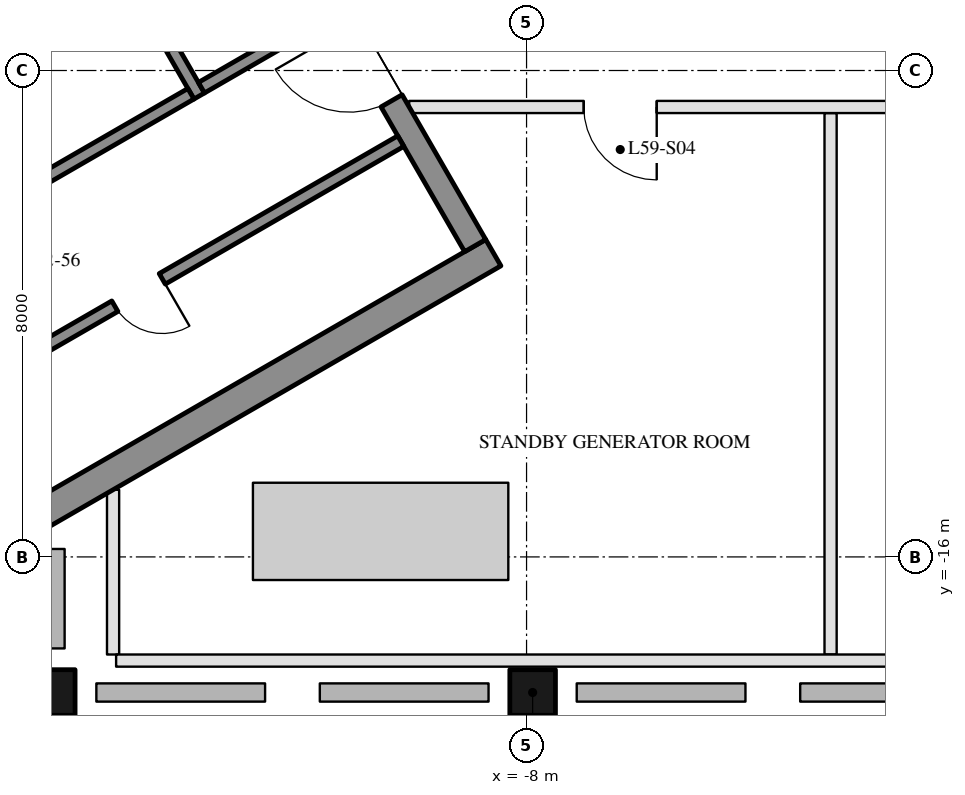
"""IFC4 building model, lengths in metres.
Left out: names, types, materials, properties, quantities, classifications, styles, units other than length and angle.
Written with IfcOpenShell. Run it as: python <this file> out.ifc"""

import sys

from ifc_helpers import new_model, si_unit, direction, frame, frame_2d, origin, origin_2d, place, context, subcontext, project, spatial, rectangle, hollow_rectangle, extrude, element, fill, save


model = new_model("IFC4")
c1 = context("Model", 3, precision=1e-05, world=origin(), true_north=direction((0.0, 1.0)))
c2 = subcontext(c1, "Body", "Model", "MODEL_VIEW")
j1 = project(units=[si_unit("LENGTHUNIT", "METRE"), si_unit("PLANEANGLEUNIT", "RADIAN")], contexts=[c1])
p1 = place(None, origin())
s1 = spatial("IfcSite", under=j1, at=p1, CompositionType="ELEMENT")
p2 = place(p1, origin())
s2 = spatial("IfcBuilding", under=s1, at=p2, CompositionType="ELEMENT")
p3 = place(p2, frame((0.0, 0.0, 242.2)))
s3 = spatial("IfcBuildingStorey", under=s2, at=p3, CompositionType="ELEMENT", Elevation=242.2)
for number, where, z_axis, x_axis in (
    (1, (-15.8, -18.23, 0.0), (0.0, 0.0, 1.0), (-1.0, 0.0, 0.0)),
    (2, (-7.9, -18.23, 0.0), (0.0, 0.0, 1.0), (-1.0, 0.0, 0.0)),
):
    element("IfcColumn", number, at=place(p3, frame(where, z_axis=z_axis, x_axis=x_axis)), inside=s3, PredefinedType="COLUMN", context=c2, shape_type="SweptSolid", body=[
        extrude(hollow_rectangle(XDim=0.75, YDim=0.75, WallThickness=0.035, at=origin_2d()), origin(), (0.0, 0.0, 1.0), 4.5),
    ])
for number, where, z_axis, x_axis in (
    (3, (-13.797, -1.903, 0.0), (0.0, 0.0, 1.0), (-0.866, -0.5, 0.0)),
    (4, (-8.547, -10.997, 0.0), (0.0, 0.0, 1.0), (-0.866, -0.5, 0.0)),
):
    element("IfcWall", number, at=place(p3, frame(where, z_axis=z_axis, x_axis=x_axis)), inside=s3, PredefinedType="SHEAR", context=c2, shape_type="SweptSolid", body=[
        extrude(rectangle(XDim=14.837, YDim=0.5, at=frame_2d((7.418, 0.0))), origin(), (0.0, 0.0, 1.0), 4.3),
    ])
p4 = place(p3, frame((-13.845, -2.22, 0.0), z_axis=(0.0, 0.0, 1.0), x_axis=(0.500004234368, -0.866022959057, 0.0)))
e5 = element("IfcWall", 5, at=p4, inside=s3, PredefinedType="SHEAR", context=c2, shape_type="SweptSolid", body=[
    extrude(rectangle(XDim=10.0, YDim=0.4, at=frame_2d((5.0, 0.0))), origin(), (0.0, 0.0, 1.0), 4.3),
])
p5 = place(p4, frame((3.55, 0.0, 0.0)))
e6 = element("IfcOpeningElement", 6, at=p5, cuts=e5, PredefinedType="OPENING", context=c2, shape_type="SweptSolid", body=[
    extrude(rectangle(XDim=1.1, YDim=2.1, at=frame_2d((0.55, 1.05))), frame((0.0, 0.21, 0.0), z_axis=(0.0, -1.0, 0.0), x_axis=(1.0, 0.0, 0.0)), (0.0, 0.0, 1.0), 0.42),
])
p6 = place(p4, frame((5.85, 0.0, 0.0)))
e7 = element("IfcOpeningElement", 7, at=p6, cuts=e5, PredefinedType="OPENING", context=c2, shape_type="SweptSolid", body=[
    extrude(rectangle(XDim=1.4, YDim=2.1, at=frame_2d((0.7, 1.05))), frame((0.0, 0.21, 0.0), z_axis=(0.0, -1.0, 0.0), x_axis=(1.0, 0.0, 0.0)), (0.0, 0.0, 1.0), 0.42),
])
p7 = place(p3, frame((-12.681, -4.636, 0.0), z_axis=(0.0, 0.0, 1.0), x_axis=(-0.866021702275, -0.500006411147, 0.0)))
e8 = element("IfcWall", 8, at=p7, inside=s3, PredefinedType="SHEAR", context=c2, shape_type="SweptSolid", body=[
    extrude(rectangle(XDim=6.45, YDim=0.25, at=frame_2d((3.225, 0.0))), origin(), (0.0, 0.0, 1.0), 4.3),
])
p8 = place(p7, frame((0.3, 0.0, 0.0)))
e9 = element("IfcOpeningElement", 9, at=p8, cuts=e8, PredefinedType="OPENING", context=c2, shape_type="SweptSolid", body=[
    extrude(rectangle(XDim=1.0, YDim=2.1, at=frame_2d((0.5, 1.05))), frame((0.0, 0.135, 0.0), z_axis=(0.0, -1.0, 0.0), x_axis=(1.0, 0.0, 0.0)), (0.0, 0.0, 1.0), 0.27),
])
p9 = place(p3, frame((-14.783, -5.995, 0.0), z_axis=(0.0, 0.0, 1.0), x_axis=(0.49994636267, -0.866056369097, 0.0)))
e10 = element("IfcWall", 10, at=p9, inside=s3, PredefinedType="SHEAR", context=c2, shape_type="SweptSolid", body=[
    extrude(rectangle(XDim=2.8, YDim=0.2, at=frame_2d((1.4, 0.0))), origin(), (0.0, 0.0, 1.0), 4.3),
])
p10 = place(p9, frame((0.7, 0.0, 0.0)))
e11 = element("IfcOpeningElement", 11, at=p10, cuts=e10, PredefinedType="OPENING", context=c2, shape_type="SweptSolid", body=[
    extrude(rectangle(XDim=1.2, YDim=2.1, at=frame_2d((0.6, 1.05))), frame((0.0, 0.11, 0.0), z_axis=(0.0, -1.0, 0.0), x_axis=(1.0, 0.0, 0.0)), (0.0, 0.0, 1.0), 0.22),
])
p11 = place(p3, frame((-13.52, -8.383, 0.0), z_axis=(0.0, 0.0, 1.0), x_axis=(-0.866034573852, -0.49998411664, 0.0)))
e12 = element("IfcWall", 12, at=p11, inside=s3, PredefinedType="SHEAR", context=c2, shape_type="SweptSolid", body=[
    extrude(rectangle(XDim=2.8, YDim=0.2, at=frame_2d((1.4, 0.0))), origin(), (0.0, 0.0, 1.0), 4.3),
])
p12 = place(p3, frame((-11.268, -7.083, 0.0), z_axis=(0.0, 0.0, 1.0), x_axis=(-0.866050077142, -0.499957262057, 0.0)))
e13 = element("IfcWall", 13, at=p12, inside=s3, PredefinedType="SHEAR", context=c2, shape_type="SweptSolid", body=[
    extrude(rectangle(XDim=2.4, YDim=0.2, at=frame_2d((1.2, 0.0))), origin(), (0.0, 0.0, 1.0), 4.3),
])
p13 = place(p3, frame((-10.068, -9.162, 0.0), z_axis=(0.0, 0.0, 1.0), x_axis=(-0.866032725843, -0.499987317609, 0.0)))
e14 = element("IfcWall", 14, at=p13, inside=s3, PredefinedType="SHEAR", context=c2, shape_type="SweptSolid", body=[
    extrude(rectangle(XDim=10.16, YDim=0.2, at=frame_2d((5.08, 0.0))), origin(), (0.0, 0.0, 1.0), 4.3),
])
p14 = place(p13, frame((4.53, 0.0, 0.0)))
e15 = element("IfcOpeningElement", 15, at=p14, cuts=e14, PredefinedType="OPENING", context=c2, shape_type="SweptSolid", body=[
    extrude(rectangle(XDim=0.9, YDim=2.1, at=frame_2d((0.45, 1.05))), frame((0.0, 0.11, 0.0), z_axis=(0.0, -1.0, 0.0), x_axis=(1.0, 0.0, 0.0)), (0.0, 0.0, 1.0), 0.22),
])
p15 = place(p3, frame((-14.8, -17.605, 0.0), z_axis=(0.0, 0.0, 1.0), x_axis=(0.0, 1.0, 0.0)))
e16 = element("IfcWall", 16, at=p15, inside=s3, PredefinedType="PARTITIONING", context=c2, shape_type="SweptSolid", body=[
    extrude(rectangle(XDim=2.709, YDim=0.2, at=frame_2d((1.355, 0.0))), origin(), (0.0, 0.0, 1.0), 4.35),
])
p16 = place(p3, frame((-3.0, -17.605, 0.0), z_axis=(0.0, 0.0, 1.0), x_axis=(0.0, 1.0, 0.0)))
e17 = element("IfcWall", 17, at=p16, inside=s3, PredefinedType="PARTITIONING", context=c2, shape_type="SweptSolid", body=[
    extrude(rectangle(XDim=8.905, YDim=0.2, at=frame_2d((4.453, 0.0))), origin(), (0.0, 0.0, 1.0), 4.35),
])
p17 = place(p3, frame((-14.75, -17.705, 0.0), z_axis=(0.0, 0.0, 1.0), x_axis=(1.0, 0.0, 0.0)))
e18 = element("IfcWall", 18, at=p17, inside=s3, PredefinedType="PARTITIONING", context=c2, shape_type="SweptSolid", body=[
    extrude(rectangle(XDim=29.5, YDim=0.2, at=frame_2d((14.75, 0.0))), origin(), (0.0, 0.0, 1.0), 3.75),
])
p18 = place(p3, frame((-9.93, -8.6, 0.0), z_axis=(0.0, 0.0, 1.0), x_axis=(1.0, 0.0, 0.0)))
e19 = element("IfcWall", 19, at=p18, inside=s3, PredefinedType="PARTITIONING", context=c2, shape_type="SweptSolid", body=[
    extrude(rectangle(XDim=19.861, YDim=0.2, at=frame_2d((9.93, 0.0))), origin(), (0.0, 0.0, 1.0), 3.75),
])
p19 = place(p18, frame((2.871, 0.0, 0.0)))
e20 = element("IfcOpeningElement", 20, at=p19, cuts=e19, PredefinedType="OPENING", context=c2, shape_type="SweptSolid", body=[
    extrude(rectangle(XDim=1.2, YDim=2.1, at=frame_2d((0.6, 1.05))), frame((0.0, 0.11, 0.0), z_axis=(0.0, -1.0, 0.0), x_axis=(1.0, 0.0, 0.0)), (0.0, 0.0, 1.0), 0.22),
])
p20 = place(p18, frame((10.081, 0.0, 0.0)))
e21 = element("IfcOpeningElement", 21, at=p20, cuts=e19, PredefinedType="OPENING", context=c2, shape_type="SweptSolid", body=[
    extrude(rectangle(XDim=1.2, YDim=2.1, at=frame_2d((0.6, 1.05))), frame((0.0, 0.11, 0.0), z_axis=(0.0, -1.0, 0.0), x_axis=(1.0, 0.0, 0.0)), (0.0, 0.0, 1.0), 0.22),
])
p21 = place(p18, frame((16.54, 0.0, 0.0)))
e22 = element("IfcOpeningElement", 22, at=p21, cuts=e19, PredefinedType="OPENING", context=c2, shape_type="SweptSolid", body=[
    extrude(rectangle(XDim=1.2, YDim=2.1, at=frame_2d((0.6, 1.05))), frame((0.0, 0.11, 0.0), z_axis=(0.0, -1.0, 0.0), x_axis=(1.0, 0.0, 0.0)), (0.0, 0.0, 1.0), 0.22),
])
p22 = place(p14, origin())
e23 = element("IfcDoor", 23, at=p22, inside=s3, OperationType="SINGLE_SWING_LEFT", PredefinedType="DOOR", context=c2, shape_type="SweptSolid", body=[
    extrude(rectangle(XDim=0.9, YDim=2.1, at=frame_2d((0.45, 1.05))), frame((0.0, 0.025, 0.0), z_axis=(0.0, -1.0, 0.0), x_axis=(1.0, 0.0, 0.0)), (0.0, 0.0, 1.0), 0.05),
])
fill(e15, e23)
p23 = place(p6, frame((1.4, 0.0, 0.0), z_axis=(0.0, 0.0, 1.0), x_axis=(-1.0, 0.0, 0.0)))
e24 = element("IfcDoor", 24, at=p23, inside=s3, OperationType="DOUBLE_DOOR_SINGLE_SWING", PredefinedType="DOOR", context=c2, shape_type="SweptSolid", body=[
    extrude(rectangle(XDim=1.4, YDim=2.1, at=frame_2d((0.7, 1.05))), frame((0.0, 0.025, 0.0), z_axis=(0.0, -1.0, 0.0), x_axis=(1.0, 0.0, 0.0)), (0.0, 0.0, 1.0), 0.05),
])
fill(e7, e24)
p24 = place(p19, frame((1.2, 0.0, 0.0), z_axis=(0.0, 0.0, 1.0), x_axis=(-1.0, 0.0, 0.0)))
e25 = element("IfcDoor", 25, at=p24, inside=s3, OperationType="SINGLE_SWING_LEFT", PredefinedType="DOOR", context=c2, shape_type="SweptSolid", body=[
    extrude(rectangle(XDim=1.2, YDim=2.1, at=frame_2d((0.6, 1.05))), frame((0.0, 0.025, 0.0), z_axis=(0.0, -1.0, 0.0), x_axis=(1.0, 0.0, 0.0)), (0.0, 0.0, 1.0), 0.05),
])
fill(e20, e25)
save(model, sys.argv[1])
